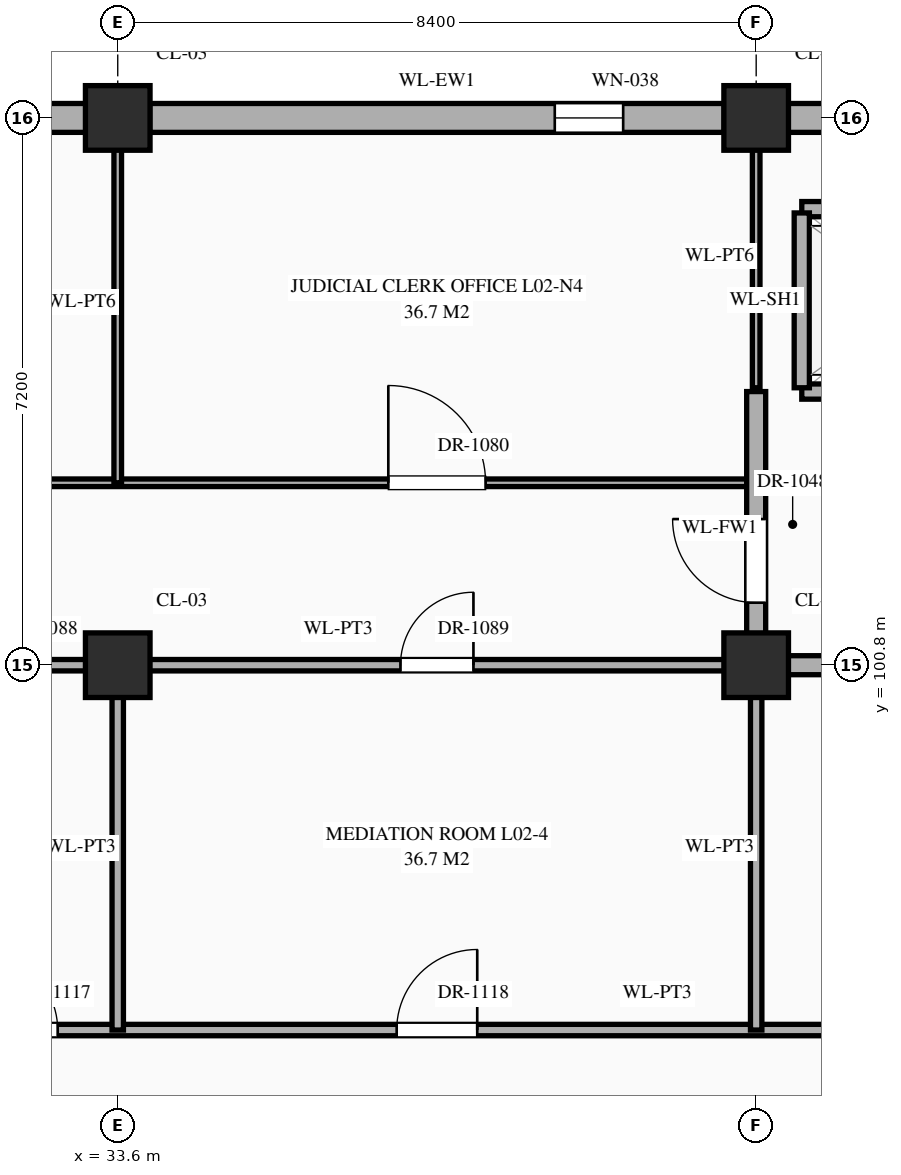
"""IFC4 building model, lengths in metres.
Left out: names, types, materials, properties, quantities, classifications, styles, units other than length and angle.
Written with IfcOpenShell. Run it as: python <this file> out.ifc"""

import sys

from ifc_helpers import new_model, si_unit, direction, frame, frame_2d, origin, origin_2d, place, context, subcontext, project, spatial, rectangle, extrude, element, fill, save


model = new_model("IFC4")
c1 = context("Model", 3, precision=1e-05, world=origin(), true_north=direction((0.0, 1.0)))
c2 = subcontext(c1, "Body", "Model", "MODEL_VIEW")
j1 = project(units=[si_unit("LENGTHUNIT", "METRE"), si_unit("PLANEANGLEUNIT", "RADIAN")], contexts=[c1])
p1 = place(None, origin())
s1 = spatial("IfcSite", under=j1, at=p1, CompositionType="ELEMENT")
p2 = place(p1, origin())
s2 = spatial("IfcBuilding", under=s1, at=p2, CompositionType="ELEMENT")
p3 = place(p2, frame((0.0, 0.0, 5.4)))
s3 = spatial("IfcBuildingStorey", under=s2, at=p3, CompositionType="ELEMENT", Elevation=5.4)
for number, where, z_axis, x_axis in (
    (1, (33.6, 100.8, 0.0), (0.0, 0.0, 1.0), (1.0, 0.0, 0.0)),
    (2, (33.6, 108.0, 0.0), (0.0, 0.0, 1.0), (1.0, 0.0, 0.0)),
    (3, (42.0, 100.8, 0.0), (0.0, 0.0, 1.0), (1.0, 0.0, 0.0)),
    (4, (42.0, 108.0, 0.0), (0.0, 0.0, 1.0), (1.0, 0.0, 0.0)),
):
    element("IfcColumn", number, at=place(p3, frame(where, z_axis=z_axis, x_axis=x_axis)), inside=s3, PredefinedType="COLUMN", context=c2, shape_type="SweptSolid", body=[
        extrude(rectangle(XDim=0.85, YDim=0.85, at=origin_2d()), origin(), (0.0, 0.0, 1.0), 5.4),
    ])
p4 = place(p3, frame((25.62, 108.0, 0.0), z_axis=(0.0, 0.0, 1.0), x_axis=(1.0, 0.0, 0.0)))
e5 = element("IfcWall", 5, at=p4, inside=s3, PredefinedType="STANDARD", context=c2, shape_type="SweptSolid", body=[
    extrude(rectangle(XDim=7.56, YDim=0.38, at=frame_2d((3.78, 0.0))), origin(), (0.0, 0.0, 1.0), 4.47),
])
p5 = place(p4, frame((5.33, 0.0, 0.85)))
e6 = element("IfcOpeningElement", 6, at=p5, cuts=e5, PredefinedType="OPENING", context=c2, shape_type="SweptSolid", body=[
    extrude(rectangle(XDim=0.9, YDim=1.38, at=frame_2d((0.45, 0.69))), frame((0.0, 0.202, 0.0), z_axis=(0.0, -1.0, 0.0), x_axis=(1.0, 0.0, 0.0)), (0.0, 0.0, 1.0), 0.404),
])
p6 = place(p3, frame((34.02, 108.0, 0.0), z_axis=(0.0, 0.0, 1.0), x_axis=(1.0, 0.0, 0.0)))
e7 = element("IfcWall", 7, at=p6, inside=s3, PredefinedType="STANDARD", context=c2, shape_type="SweptSolid", body=[
    extrude(rectangle(XDim=7.56, YDim=0.38, at=frame_2d((3.78, 0.0))), origin(), (0.0, 0.0, 1.0), 4.47),
])
p7 = place(p6, frame((5.33, 0.0, 0.85)))
e8 = element("IfcOpeningElement", 8, at=p7, cuts=e7, PredefinedType="OPENING", context=c2, shape_type="SweptSolid", body=[
    extrude(rectangle(XDim=0.9, YDim=1.56, at=frame_2d((0.45, 0.78))), frame((0.0, 0.202, 0.0), z_axis=(0.0, -1.0, 0.0), x_axis=(1.0, 0.0, 0.0)), (0.0, 0.0, 1.0), 0.404),
])
p8 = place(p3, frame((42.42, 108.0, 0.0), z_axis=(0.0, 0.0, 1.0), x_axis=(1.0, 0.0, 0.0)))
e9 = element("IfcWall", 9, at=p8, inside=s3, PredefinedType="STANDARD", context=c2, shape_type="SweptSolid", body=[
    extrude(rectangle(XDim=7.535, YDim=0.38, at=frame_2d((3.768, 0.0))), origin(), (0.0, 0.0, 1.0), 4.47),
])
p9 = place(p3, frame((31.0, 96.0, 0.0), z_axis=(0.0, 0.0, 1.0), x_axis=(1.0, 0.0, 0.0)))
e10 = element("IfcWall", 10, at=p9, inside=s3, PredefinedType="STANDARD", context=c2, shape_type="SweptSolid", body=[
    extrude(rectangle(XDim=19.4, YDim=0.15, at=frame_2d((9.7, 0.0))), origin(), (0.0, 0.0, 1.0), 5.12),
])
p10 = place(p9, frame((0.79, 0.0, 0.0)))
e11 = element("IfcOpeningElement", 11, at=p10, cuts=e10, PredefinedType="OPENING", context=c2, shape_type="SweptSolid", body=[
    extrude(rectangle(XDim=1.02, YDim=2.4, at=frame_2d((0.51, 1.2))), frame((0.0, 0.087, 0.0), z_axis=(0.0, -1.0, 0.0), x_axis=(1.0, 0.0, 0.0)), (0.0, 0.0, 1.0), 0.174),
])
p11 = place(p9, frame((6.27, 0.0, 0.0)))
e12 = element("IfcOpeningElement", 12, at=p11, cuts=e10, PredefinedType="OPENING", context=c2, shape_type="SweptSolid", body=[
    extrude(rectangle(XDim=1.06, YDim=2.4, at=frame_2d((0.53, 1.2))), frame((0.0, 0.087, 0.0), z_axis=(0.0, -1.0, 0.0), x_axis=(1.0, 0.0, 0.0)), (0.0, 0.0, 1.0), 0.174),
])
p12 = place(p9, frame((14.63, 0.0, 0.0)))
e13 = element("IfcOpeningElement", 13, at=p12, cuts=e10, PredefinedType="OPENING", context=c2, shape_type="SweptSolid", body=[
    extrude(rectangle(XDim=1.14, YDim=2.4, at=frame_2d((0.57, 1.2))), frame((0.0, 0.087, 0.0), z_axis=(0.0, -1.0, 0.0), x_axis=(1.0, 0.0, 0.0)), (0.0, 0.0, 1.0), 0.174),
])
p13 = place(p3, frame((31.0, 100.8, 0.0), z_axis=(0.0, 0.0, 1.0), x_axis=(1.0, 0.0, 0.0)))
e14 = element("IfcWall", 14, at=p13, inside=s3, PredefinedType="STANDARD", context=c2, shape_type="SweptSolid", body=[
    extrude(rectangle(XDim=11.0, YDim=0.15, at=frame_2d((5.5, 0.0))), origin(), (0.0, 0.0, 1.0), 4.27),
])
p14 = place(p13, frame((0.667, 0.0, 0.0)))
e15 = element("IfcOpeningElement", 15, at=p14, cuts=e14, PredefinedType="OPENING", context=c2, shape_type="SweptSolid", body=[
    extrude(rectangle(XDim=0.92, YDim=2.15, at=frame_2d((0.46, 1.075))), frame((0.0, 0.087, 0.0), z_axis=(0.0, -1.0, 0.0), x_axis=(1.0, 0.0, 0.0)), (0.0, 0.0, 1.0), 0.174),
])
p15 = place(p13, frame((6.32, 0.0, 0.0)))
e16 = element("IfcOpeningElement", 16, at=p15, cuts=e14, PredefinedType="OPENING", context=c2, shape_type="SweptSolid", body=[
    extrude(rectangle(XDim=0.96, YDim=2.2, at=frame_2d((0.48, 1.1))), frame((0.0, 0.087, 0.0), z_axis=(0.0, -1.0, 0.0), x_axis=(1.0, 0.0, 0.0)), (0.0, 0.0, 1.0), 0.174),
])
p16 = place(p3, frame((42.0, 100.8, 0.0), z_axis=(0.0, 0.0, 1.0), x_axis=(1.0, 0.0, 0.0)))
e17 = element("IfcWall", 17, at=p16, inside=s3, PredefinedType="STANDARD", context=c2, shape_type="SweptSolid", body=[
    extrude(rectangle(XDim=4.2, YDim=0.25, at=frame_2d((2.1, 0.0))), origin(), (0.0, 0.0, 1.0), 4.27),
])
p17 = place(p3, frame((0.04, 103.2, 0.0), z_axis=(0.0, 0.0, 1.0), x_axis=(1.0, 0.0, 0.0)))
e18 = element("IfcWall", 18, at=p17, inside=s3, PredefinedType="STANDARD", context=c2, shape_type="SweptSolid", body=[
    extrude(rectangle(XDim=41.96, YDim=0.1, at=frame_2d((20.98, 0.0))), origin(), (0.0, 0.0, 1.0), 5.12),
])
p18 = place(p17, frame((3.62, 0.0, 0.0)))
e19 = element("IfcOpeningElement", 19, at=p18, cuts=e18, PredefinedType="OPENING", context=c2, shape_type="SweptSolid", body=[
    extrude(rectangle(XDim=1.12, YDim=2.25, at=frame_2d((0.56, 1.125))), frame((0.0, 0.062, 0.0), z_axis=(0.0, -1.0, 0.0), x_axis=(1.0, 0.0, 0.0)), (0.0, 0.0, 1.0), 0.124),
])
p19 = place(p17, frame((11.98, 0.0, 0.0)))
e20 = element("IfcOpeningElement", 20, at=p19, cuts=e18, PredefinedType="OPENING", context=c2, shape_type="SweptSolid", body=[
    extrude(rectangle(XDim=1.16, YDim=2.3, at=frame_2d((0.58, 1.15))), frame((0.0, 0.062, 0.0), z_axis=(0.0, -1.0, 0.0), x_axis=(1.0, 0.0, 0.0)), (0.0, 0.0, 1.0), 0.124),
])
p20 = place(p17, frame((20.36, 0.0, 0.0)))
e21 = element("IfcOpeningElement", 21, at=p20, cuts=e18, PredefinedType="OPENING", context=c2, shape_type="SweptSolid", body=[
    extrude(rectangle(XDim=1.2, YDim=2.35, at=frame_2d((0.6, 1.175))), frame((0.0, 0.062, 0.0), z_axis=(0.0, -1.0, 0.0), x_axis=(1.0, 0.0, 0.0)), (0.0, 0.0, 1.0), 0.124),
])
p21 = place(p17, frame((28.74, 0.0, 0.0)))
e22 = element("IfcOpeningElement", 22, at=p21, cuts=e18, PredefinedType="OPENING", context=c2, shape_type="SweptSolid", body=[
    extrude(rectangle(XDim=1.24, YDim=2.3, at=frame_2d((0.62, 1.15))), frame((0.0, 0.062, 0.0), z_axis=(0.0, -1.0, 0.0), x_axis=(1.0, 0.0, 0.0)), (0.0, 0.0, 1.0), 0.124),
])
p22 = place(p17, frame((37.12, 0.0, 0.0)))
e23 = element("IfcOpeningElement", 23, at=p22, cuts=e18, PredefinedType="OPENING", context=c2, shape_type="SweptSolid", body=[
    extrude(rectangle(XDim=1.28, YDim=2.35, at=frame_2d((0.64, 1.175))), frame((0.0, 0.062, 0.0), z_axis=(0.0, -1.0, 0.0), x_axis=(1.0, 0.0, 0.0)), (0.0, 0.0, 1.0), 0.124),
])
p23 = place(p3, frame((42.6, 104.4, 0.0), z_axis=(0.0, 0.0, 1.0), x_axis=(1.0, 0.0, 0.0)))
e24 = element("IfcWall", 24, at=p23, inside=s3, PredefinedType="STANDARD", context=c2, shape_type="SweptSolid", body=[
    extrude(rectangle(XDim=3.0, YDim=0.2, at=frame_2d((1.5, 0.0))), origin(), (0.0, 0.0, 1.0), 5.12),
])
p24 = place(p23, frame((0.9, 0.0, 0.0)))
e25 = element("IfcOpeningElement", 25, at=p24, cuts=e24, PredefinedType="OPENING", context=c2, shape_type="SweptSolid", body=[
    extrude(rectangle(XDim=1.2, YDim=2.15, at=frame_2d((0.6, 1.075))), frame((0.0, 0.112, 0.0), z_axis=(0.0, -1.0, 0.0), x_axis=(1.0, 0.0, 0.0)), (0.0, 0.0, 1.0), 0.224),
])
p25 = place(p3, frame((42.6, 106.8, 0.0), z_axis=(0.0, 0.0, 1.0), x_axis=(1.0, 0.0, 0.0)))
e26 = element("IfcWall", 26, at=p25, inside=s3, PredefinedType="STANDARD", context=c2, shape_type="SweptSolid", body=[
    extrude(rectangle(XDim=3.0, YDim=0.2, at=frame_2d((1.5, 0.0))), origin(), (0.0, 0.0, 1.0), 5.12),
])
p26 = place(p3, frame((33.6, 96.0, 0.0), z_axis=(0.0, 0.0, 1.0), x_axis=(0.0, 1.0, 0.0)))
e27 = element("IfcWall", 27, at=p26, inside=s3, PredefinedType="STANDARD", context=c2, shape_type="SweptSolid", body=[
    extrude(rectangle(XDim=4.8, YDim=0.15, at=frame_2d((2.4, 0.0))), origin(), (0.0, 0.0, 1.0), 4.37),
])
p27 = place(p3, frame((33.6, 103.2, 0.0), z_axis=(0.0, 0.0, 1.0), x_axis=(0.0, 1.0, 0.0)))
e28 = element("IfcWall", 28, at=p27, inside=s3, PredefinedType="STANDARD", context=c2, shape_type="SweptSolid", body=[
    extrude(rectangle(XDim=4.76, YDim=0.1, at=frame_2d((2.38, 0.0))), origin(), (0.0, 0.0, 1.0), 4.37),
])
p28 = place(p3, frame((42.0, 96.0, 0.0), z_axis=(0.0, 0.0, 1.0), x_axis=(0.0, 1.0, 0.0)))
e29 = element("IfcWall", 29, at=p28, inside=s3, PredefinedType="STANDARD", context=c2, shape_type="SweptSolid", body=[
    extrude(rectangle(XDim=4.8, YDim=0.15, at=frame_2d((2.4, 0.0))), origin(), (0.0, 0.0, 1.0), 4.37),
])
p29 = place(p3, frame((42.0, 100.8, 0.0), z_axis=(0.0, 0.0, 1.0), x_axis=(0.0, 1.0, 0.0)))
e30 = element("IfcWall", 30, at=p29, inside=s3, PredefinedType="STANDARD", context=c2, shape_type="SweptSolid", body=[
    extrude(rectangle(XDim=3.6, YDim=0.25, at=frame_2d((1.8, 0.0))), origin(), (0.0, 0.0, 1.0), 4.37),
])
p30 = place(p29, frame((0.823, 0.0, 0.0)))
e31 = element("IfcOpeningElement", 31, at=p30, cuts=e30, PredefinedType="OPENING", context=c2, shape_type="SweptSolid", body=[
    extrude(rectangle(XDim=1.1, YDim=2.2, at=frame_2d((0.55, 1.1))), frame((0.0, 0.137, 0.0), z_axis=(0.0, -1.0, 0.0), x_axis=(1.0, 0.0, 0.0)), (0.0, 0.0, 1.0), 0.274),
])
p31 = place(p3, frame((42.0, 104.45, 0.0), z_axis=(0.0, 0.0, 1.0), x_axis=(0.0, 1.0, 0.0)))
e32 = element("IfcWall", 32, at=p31, inside=s3, PredefinedType="STANDARD", context=c2, shape_type="SweptSolid", body=[
    extrude(rectangle(XDim=3.46, YDim=0.1, at=frame_2d((1.73, 0.0))), origin(), (0.0, 0.0, 1.0), 4.37),
])
p32 = place(p3, frame((42.6, 104.45, 0.0), z_axis=(0.0, 0.0, 1.0), x_axis=(0.0, 1.0, 0.0)))
e33 = element("IfcWall", 33, at=p32, inside=s3, PredefinedType="STANDARD", context=c2, shape_type="SweptSolid", body=[
    extrude(rectangle(XDim=2.3, YDim=0.2, at=frame_2d((1.15, 0.0))), origin(), (0.0, 0.0, 1.0), 5.12),
])
p33 = place(p7, origin())
e34 = element("IfcWindow", 34, at=p33, inside=s3, PartitioningType="SINGLE_PANEL", PredefinedType="WINDOW", context=c2, shape_type="SweptSolid", body=[
    extrude(rectangle(XDim=0.9, YDim=1.56, at=frame_2d((0.45, 0.78))), frame((0.0, 0.03, 0.0), z_axis=(0.0, -1.0, 0.0), x_axis=(1.0, 0.0, 0.0)), (0.0, 0.0, 1.0), 0.06),
])
fill(e8, e34)
p34 = place(p30, origin())
e35 = element("IfcDoor", 35, at=p34, inside=s3, OperationType="SINGLE_SWING_RIGHT", PredefinedType="DOOR", context=c2, shape_type="SweptSolid", body=[
    extrude(rectangle(XDim=1.1, YDim=2.2, at=frame_2d((0.55, 1.1))), frame((0.0, 0.025, 0.0), z_axis=(0.0, -1.0, 0.0), x_axis=(1.0, 0.0, 0.0)), (0.0, 0.0, 1.0), 0.05),
])
fill(e31, e35)
p35 = place(p22, origin())
e36 = element("IfcDoor", 36, at=p35, inside=s3, OperationType="SINGLE_SWING_LEFT", PredefinedType="DOOR", context=c2, shape_type="SweptSolid", body=[
    extrude(rectangle(XDim=1.28, YDim=2.35, at=frame_2d((0.64, 1.175))), frame((0.0, 0.025, 0.0), z_axis=(0.0, -1.0, 0.0), x_axis=(1.0, 0.0, 0.0)), (0.0, 0.0, 1.0), 0.05),
])
fill(e23, e36)
p36 = place(p15, origin())
e37 = element("IfcDoor", 37, at=p36, inside=s3, OperationType="SINGLE_SWING_RIGHT", PredefinedType="DOOR", context=c2, shape_type="SweptSolid", body=[
    extrude(rectangle(XDim=0.96, YDim=2.2, at=frame_2d((0.48, 1.1))), frame((0.0, 0.025, 0.0), z_axis=(0.0, -1.0, 0.0), x_axis=(1.0, 0.0, 0.0)), (0.0, 0.0, 1.0), 0.05),
])
fill(e16, e37)
p37 = place(p10, origin())
e38 = element("IfcDoor", 38, at=p37, inside=s3, OperationType="SINGLE_SWING_LEFT", PredefinedType="DOOR", context=c2, shape_type="SweptSolid", body=[
    extrude(rectangle(XDim=1.02, YDim=2.4, at=frame_2d((0.51, 1.2))), frame((0.0, 0.025, 0.0), z_axis=(0.0, -1.0, 0.0), x_axis=(1.0, 0.0, 0.0)), (0.0, 0.0, 1.0), 0.05),
])
fill(e11, e38)
p38 = place(p11, origin())
e39 = element("IfcDoor", 39, at=p38, inside=s3, OperationType="SINGLE_SWING_RIGHT", PredefinedType="DOOR", context=c2, shape_type="SweptSolid", body=[
    extrude(rectangle(XDim=1.06, YDim=2.4, at=frame_2d((0.53, 1.2))), frame((0.0, 0.025, 0.0), z_axis=(0.0, -1.0, 0.0), x_axis=(1.0, 0.0, 0.0)), (0.0, 0.0, 1.0), 0.05),
])
fill(e12, e39)
save(model, sys.argv[1])
